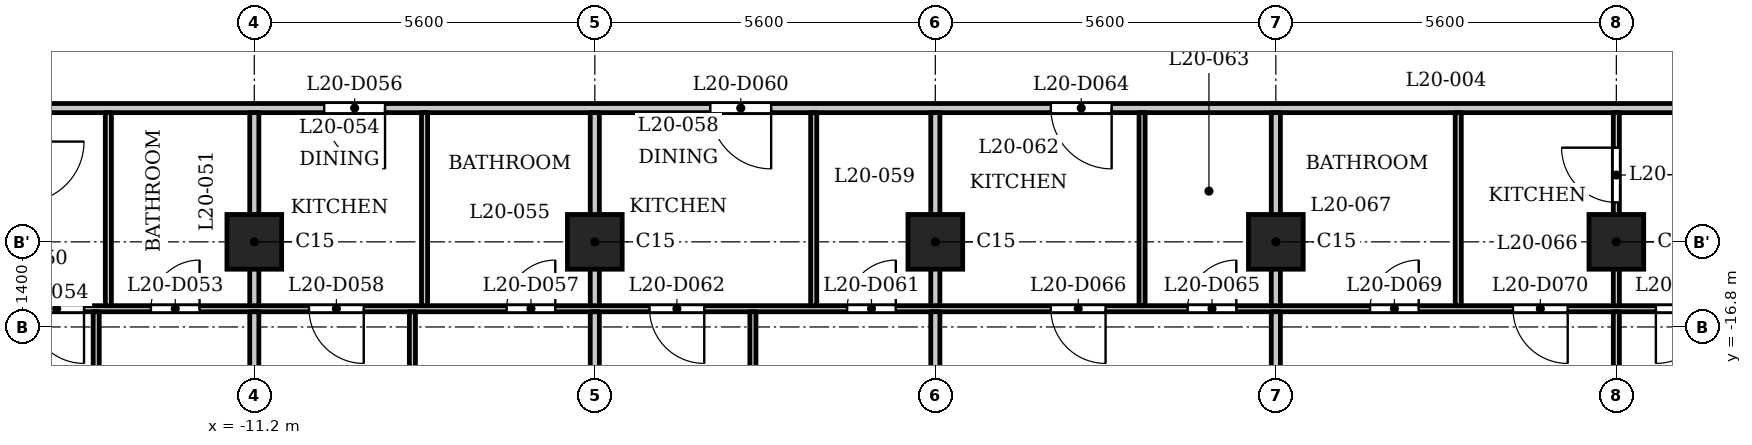
"""IFC4 building model, lengths in metres.
Left out: names, types, materials, properties, quantities, classifications, styles, units other than length and angle.
Written with IfcOpenShell. Run it as: python <this file> out.ifc"""

import sys

from ifc_helpers import new_model, si_unit, direction, frame, frame_2d, origin, origin_2d, place, context, subcontext, project, spatial, rectangle, extrude, element, fill, save


model = new_model("IFC4")
c1 = context("Model", 3, precision=1e-05, world=origin(), true_north=direction((0.0, 1.0)))
c2 = subcontext(c1, "Body", "Model", "MODEL_VIEW")
j1 = project(units=[si_unit("LENGTHUNIT", "METRE"), si_unit("PLANEANGLEUNIT", "RADIAN")], contexts=[c1])
p1 = place(None, origin())
s1 = spatial("IfcSite", under=j1, at=p1, CompositionType="ELEMENT")
p2 = place(p1, origin())
s2 = spatial("IfcBuilding", under=s1, at=p2, CompositionType="ELEMENT")
p3 = place(p2, frame((0.0, 0.0, 83.3)))
s3 = spatial("IfcBuildingStorey", under=s2, at=p3, CompositionType="ELEMENT", Elevation=83.3)
for number, where, z_axis, x_axis in (
    (1, (-11.2, -15.4, 0.0), (0.0, 0.0, 1.0), (1.0, 0.0, 0.0)),
    (2, (-5.6, -15.4, 0.0), (0.0, 0.0, 1.0), (1.0, 0.0, 0.0)),
    (3, (0.0, -15.4, 0.0), (0.0, 0.0, 1.0), (1.0, 0.0, 0.0)),
    (4, (5.6, -15.4, 0.0), (0.0, 0.0, 1.0), (1.0, 0.0, 0.0)),
    (5, (11.2, -15.4, 0.0), (0.0, 0.0, 1.0), (1.0, 0.0, 0.0)),
):
    element("IfcColumn", number, at=place(p3, frame(where, z_axis=z_axis, x_axis=x_axis)), inside=s3, PredefinedType="COLUMN", context=c2, shape_type="SweptSolid", body=[
        extrude(rectangle(XDim=0.9, YDim=0.9, at=origin_2d()), origin(), (0.0, 0.0, 1.0), 3.5),
    ])
p4 = place(p3, frame((-16.725, -16.5, 0.0), z_axis=(0.0, 0.0, 1.0), x_axis=(1.0, 0.0, 0.0)))
e6 = element("IfcWall", 6, at=p4, inside=s3, PredefinedType="PARTITIONING", context=c2, shape_type="SweptSolid", body=[
    extrude(rectangle(XDim=33.45, YDim=0.1, at=frame_2d((16.725, 0.0))), origin(), (0.0, 0.0, 1.0), 3.2),
])
p5 = place(p4, frame((3.825, 0.0, 0.0)))
e7 = element("IfcOpeningElement", 7, at=p5, cuts=e6, PredefinedType="OPENING", context=c2, shape_type="SweptSolid", body=[
    extrude(rectangle(XDim=0.8, YDim=2.1, at=frame_2d((0.4, 1.05))), frame((0.0, 0.06, 0.0), z_axis=(0.0, -1.0, 0.0), x_axis=(1.0, 0.0, 0.0)), (0.0, 0.0, 1.0), 0.12),
])
p6 = place(p4, frame((1.825, 0.0, 0.0)))
e8 = element("IfcOpeningElement", 8, at=p6, cuts=e6, PredefinedType="OPENING", context=c2, shape_type="SweptSolid", body=[
    extrude(rectangle(XDim=0.9, YDim=2.1, at=frame_2d((0.45, 1.05))), frame((0.0, 0.06, 0.0), z_axis=(0.0, -1.0, 0.0), x_axis=(1.0, 0.0, 0.0)), (0.0, 0.0, 1.0), 0.12),
])
p7 = place(p4, frame((9.675, 0.0, 0.0)))
e9 = element("IfcOpeningElement", 9, at=p7, cuts=e6, PredefinedType="OPENING", context=c2, shape_type="SweptSolid", body=[
    extrude(rectangle(XDim=0.8, YDim=2.1, at=frame_2d((0.4, 1.05))), frame((0.0, 0.06, 0.0), z_axis=(0.0, -1.0, 0.0), x_axis=(1.0, 0.0, 0.0)), (0.0, 0.0, 1.0), 0.12),
])
p8 = place(p4, frame((6.425, 0.0, 0.0)))
e10 = element("IfcOpeningElement", 10, at=p8, cuts=e6, PredefinedType="OPENING", context=c2, shape_type="SweptSolid", body=[
    extrude(rectangle(XDim=0.9, YDim=2.1, at=frame_2d((0.45, 1.05))), frame((0.0, 0.06, 0.0), z_axis=(0.0, -1.0, 0.0), x_axis=(1.0, 0.0, 0.0)), (0.0, 0.0, 1.0), 0.12),
])
p9 = place(p4, frame((15.275, 0.0, 0.0)))
e11 = element("IfcOpeningElement", 11, at=p9, cuts=e6, PredefinedType="OPENING", context=c2, shape_type="SweptSolid", body=[
    extrude(rectangle(XDim=0.8, YDim=2.1, at=frame_2d((0.4, 1.05))), frame((0.0, 0.06, 0.0), z_axis=(0.0, -1.0, 0.0), x_axis=(1.0, 0.0, 0.0)), (0.0, 0.0, 1.0), 0.12),
])
p10 = place(p4, frame((12.025, 0.0, 0.0)))
e12 = element("IfcOpeningElement", 12, at=p10, cuts=e6, PredefinedType="OPENING", context=c2, shape_type="SweptSolid", body=[
    extrude(rectangle(XDim=0.9, YDim=2.1, at=frame_2d((0.45, 1.05))), frame((0.0, 0.06, 0.0), z_axis=(0.0, -1.0, 0.0), x_axis=(1.0, 0.0, 0.0)), (0.0, 0.0, 1.0), 0.12),
])
p11 = place(p4, frame((20.875, 0.0, 0.0)))
e13 = element("IfcOpeningElement", 13, at=p11, cuts=e6, PredefinedType="OPENING", context=c2, shape_type="SweptSolid", body=[
    extrude(rectangle(XDim=0.8, YDim=2.1, at=frame_2d((0.4, 1.05))), frame((0.0, 0.06, 0.0), z_axis=(0.0, -1.0, 0.0), x_axis=(1.0, 0.0, 0.0)), (0.0, 0.0, 1.0), 0.12),
])
p12 = place(p4, frame((18.625, 0.0, 0.0)))
e14 = element("IfcOpeningElement", 14, at=p12, cuts=e6, PredefinedType="OPENING", context=c2, shape_type="SweptSolid", body=[
    extrude(rectangle(XDim=0.9, YDim=2.1, at=frame_2d((0.45, 1.05))), frame((0.0, 0.06, 0.0), z_axis=(0.0, -1.0, 0.0), x_axis=(1.0, 0.0, 0.0)), (0.0, 0.0, 1.0), 0.12),
])
p13 = place(p4, frame((23.875, 0.0, 0.0)))
e15 = element("IfcOpeningElement", 15, at=p13, cuts=e6, PredefinedType="OPENING", context=c2, shape_type="SweptSolid", body=[
    extrude(rectangle(XDim=0.8, YDim=2.1, at=frame_2d((0.4, 1.05))), frame((0.0, 0.06, 0.0), z_axis=(0.0, -1.0, 0.0), x_axis=(1.0, 0.0, 0.0)), (0.0, 0.0, 1.0), 0.12),
])
p14 = place(p4, frame((26.225, 0.0, 0.0)))
e16 = element("IfcOpeningElement", 16, at=p14, cuts=e6, PredefinedType="OPENING", context=c2, shape_type="SweptSolid", body=[
    extrude(rectangle(XDim=0.9, YDim=2.1, at=frame_2d((0.45, 1.05))), frame((0.0, 0.06, 0.0), z_axis=(0.0, -1.0, 0.0), x_axis=(1.0, 0.0, 0.0)), (0.0, 0.0, 1.0), 0.12),
])
p15 = place(p4, frame((28.575, 0.0, 0.0)))
e17 = element("IfcOpeningElement", 17, at=p15, cuts=e6, PredefinedType="OPENING", context=c2, shape_type="SweptSolid", body=[
    extrude(rectangle(XDim=0.9, YDim=2.1, at=frame_2d((0.45, 1.05))), frame((0.0, 0.06, 0.0), z_axis=(0.0, -1.0, 0.0), x_axis=(1.0, 0.0, 0.0)), (0.0, 0.0, 1.0), 0.12),
])
p16 = place(p4, frame((30.675, 0.0, 0.0)))
e18 = element("IfcOpeningElement", 18, at=p16, cuts=e6, PredefinedType="OPENING", context=c2, shape_type="SweptSolid", body=[
    extrude(rectangle(XDim=0.9, YDim=2.1, at=frame_2d((0.45, 1.05))), frame((0.0, 0.06, 0.0), z_axis=(0.0, -1.0, 0.0), x_axis=(1.0, 0.0, 0.0)), (0.0, 0.0, 1.0), 0.12),
])
p17 = place(p3, frame((-17.4, -13.2, 0.0), z_axis=(0.0, 0.0, 1.0), x_axis=(1.0, 0.0, 0.0)))
e19 = element("IfcWall", 19, at=p17, inside=s3, PredefinedType="PARTITIONING", context=c2, shape_type="SweptSolid", body=[
    extrude(rectangle(XDim=34.8, YDim=0.15, at=frame_2d((17.4, 0.0))), origin(), (0.0, 0.0, 1.0), 3.2),
])
p18 = place(p17, frame((0.15, 0.0, 0.0)))
e20 = element("IfcOpeningElement", 20, at=p18, cuts=e19, PredefinedType="OPENING", context=c2, shape_type="SweptSolid", body=[
    extrude(rectangle(XDim=1.0, YDim=2.1, at=frame_2d((0.5, 1.05))), frame((0.0, 0.085, 0.0), z_axis=(0.0, -1.0, 0.0), x_axis=(1.0, 0.0, 0.0)), (0.0, 0.0, 1.0), 0.17),
])
p19 = place(p17, frame((33.55, 0.0, 0.0)))
e21 = element("IfcOpeningElement", 21, at=p19, cuts=e19, PredefinedType="OPENING", context=c2, shape_type="SweptSolid", body=[
    extrude(rectangle(XDim=1.0, YDim=2.1, at=frame_2d((0.5, 1.05))), frame((0.0, 0.085, 0.0), z_axis=(0.0, -1.0, 0.0), x_axis=(1.0, 0.0, 0.0)), (0.0, 0.0, 1.0), 0.17),
])
p20 = place(p17, frame((7.35, 0.0, 0.0)))
e22 = element("IfcOpeningElement", 22, at=p20, cuts=e19, PredefinedType="OPENING", context=c2, shape_type="SweptSolid", body=[
    extrude(rectangle(XDim=1.0, YDim=2.1, at=frame_2d((0.5, 1.05))), frame((0.0, 0.085, 0.0), z_axis=(0.0, -1.0, 0.0), x_axis=(1.0, 0.0, 0.0)), (0.0, 0.0, 1.0), 0.17),
])
p21 = place(p17, frame((13.7, 0.0, 0.0)))
e23 = element("IfcOpeningElement", 23, at=p21, cuts=e19, PredefinedType="OPENING", context=c2, shape_type="SweptSolid", body=[
    extrude(rectangle(XDim=1.0, YDim=2.1, at=frame_2d((0.5, 1.05))), frame((0.0, 0.085, 0.0), z_axis=(0.0, -1.0, 0.0), x_axis=(1.0, 0.0, 0.0)), (0.0, 0.0, 1.0), 0.17),
])
p22 = place(p17, frame((19.3, 0.0, 0.0)))
e24 = element("IfcOpeningElement", 24, at=p22, cuts=e19, PredefinedType="OPENING", context=c2, shape_type="SweptSolid", body=[
    extrude(rectangle(XDim=1.0, YDim=2.1, at=frame_2d((0.5, 1.05))), frame((0.0, 0.085, 0.0), z_axis=(0.0, -1.0, 0.0), x_axis=(1.0, 0.0, 0.0)), (0.0, 0.0, 1.0), 0.17),
])
p23 = place(p3, frame((-13.8, -22.08, 0.0), z_axis=(0.0, 0.0, 1.0), x_axis=(0.0, 1.0, 0.0)))
e25 = element("IfcWall", 25, at=p23, inside=s3, PredefinedType="PARTITIONING", context=c2, shape_type="SweptSolid", body=[
    extrude(rectangle(XDim=5.53, YDim=0.1, at=frame_2d((2.765, 0.0))), origin(), (0.0, 0.0, 1.0), 3.2),
])
p24 = place(p23, frame((0.42, 0.0, 0.0)))
e26 = element("IfcOpeningElement", 26, at=p24, cuts=e25, PredefinedType="OPENING", context=c2, shape_type="SweptSolid", body=[
    extrude(rectangle(XDim=0.9, YDim=2.1, at=frame_2d((0.45, 1.05))), frame((0.0, 0.06, 0.0), z_axis=(0.0, -1.0, 0.0), x_axis=(1.0, 0.0, 0.0)), (0.0, 0.0, 1.0), 0.12),
])
p25 = place(p3, frame((-13.6, -16.45, 0.0), z_axis=(0.0, 0.0, 1.0), x_axis=(0.0, 1.0, 0.0)))
e27 = element("IfcWall", 27, at=p25, inside=s3, PredefinedType="PARTITIONING", context=c2, shape_type="SweptSolid", body=[
    extrude(rectangle(XDim=3.175, YDim=0.1, at=frame_2d((1.587, 0.0))), origin(), (0.0, 0.0, 1.0), 3.2),
])
p26 = place(p3, frame((-11.2, -23.03, 0.0), z_axis=(0.0, 0.0, 1.0), x_axis=(0.0, 1.0, 0.0)))
e28 = element("IfcWall", 28, at=p26, inside=s3, PredefinedType="PARTITIONING", context=c2, shape_type="SweptSolid", body=[
    extrude(rectangle(XDim=6.48, YDim=0.15, at=frame_2d((3.24, 0.0))), origin(), (0.0, 0.0, 1.0), 3.2),
])
p27 = place(p3, frame((-11.2, -16.45, 0.0), z_axis=(0.0, 0.0, 1.0), x_axis=(0.0, 1.0, 0.0)))
e29 = element("IfcWall", 29, at=p27, inside=s3, PredefinedType="PARTITIONING", context=c2, shape_type="SweptSolid", body=[
    extrude(rectangle(XDim=3.175, YDim=0.15, at=frame_2d((1.587, 0.0))), origin(), (0.0, 0.0, 1.0), 3.2),
])
p28 = place(p3, frame((-8.6, -22.08, 0.0), z_axis=(0.0, 0.0, 1.0), x_axis=(0.0, 1.0, 0.0)))
e30 = element("IfcWall", 30, at=p28, inside=s3, PredefinedType="PARTITIONING", context=c2, shape_type="SweptSolid", body=[
    extrude(rectangle(XDim=5.53, YDim=0.1, at=frame_2d((2.765, 0.0))), origin(), (0.0, 0.0, 1.0), 3.2),
])
p29 = place(p28, frame((0.42, 0.0, 0.0)))
e31 = element("IfcOpeningElement", 31, at=p29, cuts=e30, PredefinedType="OPENING", context=c2, shape_type="SweptSolid", body=[
    extrude(rectangle(XDim=0.9, YDim=2.1, at=frame_2d((0.45, 1.05))), frame((0.0, 0.06, 0.0), z_axis=(0.0, -1.0, 0.0), x_axis=(1.0, 0.0, 0.0)), (0.0, 0.0, 1.0), 0.12),
])
p30 = place(p3, frame((-8.4, -16.45, 0.0), z_axis=(0.0, 0.0, 1.0), x_axis=(0.0, 1.0, 0.0)))
e32 = element("IfcWall", 32, at=p30, inside=s3, PredefinedType="PARTITIONING", context=c2, shape_type="SweptSolid", body=[
    extrude(rectangle(XDim=3.175, YDim=0.1, at=frame_2d((1.587, 0.0))), origin(), (0.0, 0.0, 1.0), 3.2),
])
p31 = place(p3, frame((-5.6, -23.03, 0.0), z_axis=(0.0, 0.0, 1.0), x_axis=(0.0, 1.0, 0.0)))
e33 = element("IfcWall", 33, at=p31, inside=s3, PredefinedType="PARTITIONING", context=c2, shape_type="SweptSolid", body=[
    extrude(rectangle(XDim=6.48, YDim=0.15, at=frame_2d((3.24, 0.0))), origin(), (0.0, 0.0, 1.0), 3.2),
])
p32 = place(p3, frame((-5.6, -16.45, 0.0), z_axis=(0.0, 0.0, 1.0), x_axis=(0.0, 1.0, 0.0)))
e34 = element("IfcWall", 34, at=p32, inside=s3, PredefinedType="PARTITIONING", context=c2, shape_type="SweptSolid", body=[
    extrude(rectangle(XDim=3.175, YDim=0.15, at=frame_2d((1.587, 0.0))), origin(), (0.0, 0.0, 1.0), 3.2),
])
p33 = place(p3, frame((-3.0, -22.08, 0.0), z_axis=(0.0, 0.0, 1.0), x_axis=(0.0, 1.0, 0.0)))
e35 = element("IfcWall", 35, at=p33, inside=s3, PredefinedType="PARTITIONING", context=c2, shape_type="SweptSolid", body=[
    extrude(rectangle(XDim=5.53, YDim=0.1, at=frame_2d((2.765, 0.0))), origin(), (0.0, 0.0, 1.0), 3.2),
])
p34 = place(p33, frame((0.42, 0.0, 0.0)))
e36 = element("IfcOpeningElement", 36, at=p34, cuts=e35, PredefinedType="OPENING", context=c2, shape_type="SweptSolid", body=[
    extrude(rectangle(XDim=0.9, YDim=2.1, at=frame_2d((0.45, 1.05))), frame((0.0, 0.06, 0.0), z_axis=(0.0, -1.0, 0.0), x_axis=(1.0, 0.0, 0.0)), (0.0, 0.0, 1.0), 0.12),
])
p35 = place(p3, frame((-2.0, -16.45, 0.0), z_axis=(0.0, 0.0, 1.0), x_axis=(0.0, 1.0, 0.0)))
e37 = element("IfcWall", 37, at=p35, inside=s3, PredefinedType="PARTITIONING", context=c2, shape_type="SweptSolid", body=[
    extrude(rectangle(XDim=3.175, YDim=0.1, at=frame_2d((1.587, 0.0))), origin(), (0.0, 0.0, 1.0), 3.2),
])
p36 = place(p3, frame((0.0, -23.03, 0.0), z_axis=(0.0, 0.0, 1.0), x_axis=(0.0, 1.0, 0.0)))
e38 = element("IfcWall", 38, at=p36, inside=s3, PredefinedType="PARTITIONING", context=c2, shape_type="SweptSolid", body=[
    extrude(rectangle(XDim=6.48, YDim=0.15, at=frame_2d((3.24, 0.0))), origin(), (0.0, 0.0, 1.0), 3.2),
])
p37 = place(p3, frame((0.0, -16.45, 0.0), z_axis=(0.0, 0.0, 1.0), x_axis=(0.0, 1.0, 0.0)))
e39 = element("IfcWall", 39, at=p37, inside=s3, PredefinedType="PARTITIONING", context=c2, shape_type="SweptSolid", body=[
    extrude(rectangle(XDim=3.175, YDim=0.15, at=frame_2d((1.587, 0.0))), origin(), (0.0, 0.0, 1.0), 3.2),
])
p38 = place(p3, frame((3.4, -16.45, 0.0), z_axis=(0.0, 0.0, 1.0), x_axis=(0.0, 1.0, 0.0)))
e40 = element("IfcWall", 40, at=p38, inside=s3, PredefinedType="PARTITIONING", context=c2, shape_type="SweptSolid", body=[
    extrude(rectangle(XDim=3.175, YDim=0.1, at=frame_2d((1.587, 0.0))), origin(), (0.0, 0.0, 1.0), 3.2),
])
p39 = place(p3, frame((5.6, -23.03, 0.0), z_axis=(0.0, 0.0, 1.0), x_axis=(0.0, 1.0, 0.0)))
e41 = element("IfcWall", 41, at=p39, inside=s3, PredefinedType="PARTITIONING", context=c2, shape_type="SweptSolid", body=[
    extrude(rectangle(XDim=6.48, YDim=0.15, at=frame_2d((3.24, 0.0))), origin(), (0.0, 0.0, 1.0), 3.2),
])
p40 = place(p3, frame((5.6, -16.45, 0.0), z_axis=(0.0, 0.0, 1.0), x_axis=(0.0, 1.0, 0.0)))
e42 = element("IfcWall", 42, at=p40, inside=s3, PredefinedType="PARTITIONING", context=c2, shape_type="SweptSolid", body=[
    extrude(rectangle(XDim=3.175, YDim=0.15, at=frame_2d((1.587, 0.0))), origin(), (0.0, 0.0, 1.0), 3.2),
])
p41 = place(p3, frame((8.6, -16.45, 0.0), z_axis=(0.0, 0.0, 1.0), x_axis=(0.0, 1.0, 0.0)))
e43 = element("IfcWall", 43, at=p41, inside=s3, PredefinedType="PARTITIONING", context=c2, shape_type="SweptSolid", body=[
    extrude(rectangle(XDim=3.175, YDim=0.1, at=frame_2d((1.587, 0.0))), origin(), (0.0, 0.0, 1.0), 3.2),
])
p42 = place(p3, frame((11.2, -23.03, 0.0), z_axis=(0.0, 0.0, 1.0), x_axis=(0.0, 1.0, 0.0)))
e44 = element("IfcWall", 44, at=p42, inside=s3, PredefinedType="PARTITIONING", context=c2, shape_type="SweptSolid", body=[
    extrude(rectangle(XDim=6.48, YDim=0.1, at=frame_2d((3.24, 0.0))), origin(), (0.0, 0.0, 1.0), 3.2),
])
p43 = place(p3, frame((11.2, -16.45, 0.0), z_axis=(0.0, 0.0, 1.0), x_axis=(0.0, 1.0, 0.0)))
e45 = element("IfcWall", 45, at=p43, inside=s3, PredefinedType="PARTITIONING", context=c2, shape_type="SweptSolid", body=[
    extrude(rectangle(XDim=3.175, YDim=0.1, at=frame_2d((1.587, 0.0))), origin(), (0.0, 0.0, 1.0), 3.2),
])
p44 = place(p43, frame((1.699, 0.0, 0.0)))
e46 = element("IfcOpeningElement", 46, at=p44, cuts=e45, PredefinedType="OPENING", context=c2, shape_type="SweptSolid", body=[
    extrude(rectangle(XDim=0.9, YDim=2.1, at=frame_2d((0.45, 1.05))), frame((0.0, 0.06, 0.0), z_axis=(0.0, -1.0, 0.0), x_axis=(1.0, 0.0, 0.0)), (0.0, 0.0, 1.0), 0.12),
])
p45 = place(p5, origin())
e47 = element("IfcDoor", 47, at=p45, inside=s3, OperationType="SINGLE_SWING_LEFT", PredefinedType="DOOR", context=c2, shape_type="SweptSolid", body=[
    extrude(rectangle(XDim=0.8, YDim=2.1, at=frame_2d((0.4, 1.05))), frame((0.0, 0.025, 0.0), z_axis=(0.0, -1.0, 0.0), x_axis=(1.0, 0.0, 0.0)), (0.0, 0.0, 1.0), 0.05),
])
fill(e7, e47)
p46 = place(p6, origin())
e48 = element("IfcDoor", 48, at=p46, inside=s3, OperationType="SINGLE_SWING_RIGHT", PredefinedType="DOOR", context=c2, shape_type="SweptSolid", body=[
    extrude(rectangle(XDim=0.9, YDim=2.1, at=frame_2d((0.45, 1.05))), frame((0.0, 0.025, 0.0), z_axis=(0.0, -1.0, 0.0), x_axis=(1.0, 0.0, 0.0)), (0.0, 0.0, 1.0), 0.05),
])
fill(e8, e48)
p47 = place(p20, origin())
e49 = element("IfcDoor", 49, at=p47, inside=s3, OperationType="SINGLE_SWING_RIGHT", PredefinedType="DOOR", context=c2, shape_type="SweptSolid", body=[
    extrude(rectangle(XDim=1.0, YDim=2.1, at=frame_2d((0.5, 1.05))), frame((0.0, 0.025, 0.0), z_axis=(0.0, -1.0, 0.0), x_axis=(1.0, 0.0, 0.0)), (0.0, 0.0, 1.0), 0.05),
])
fill(e22, e49)
p48 = place(p7, origin())
e50 = element("IfcDoor", 50, at=p48, inside=s3, OperationType="SINGLE_SWING_LEFT", PredefinedType="DOOR", context=c2, shape_type="SweptSolid", body=[
    extrude(rectangle(XDim=0.8, YDim=2.1, at=frame_2d((0.4, 1.05))), frame((0.0, 0.025, 0.0), z_axis=(0.0, -1.0, 0.0), x_axis=(1.0, 0.0, 0.0)), (0.0, 0.0, 1.0), 0.05),
])
fill(e9, e50)
p49 = place(p8, origin())
e51 = element("IfcDoor", 51, at=p49, inside=s3, OperationType="SINGLE_SWING_RIGHT", PredefinedType="DOOR", context=c2, shape_type="SweptSolid", body=[
    extrude(rectangle(XDim=0.9, YDim=2.1, at=frame_2d((0.45, 1.05))), frame((0.0, 0.025, 0.0), z_axis=(0.0, -1.0, 0.0), x_axis=(1.0, 0.0, 0.0)), (0.0, 0.0, 1.0), 0.05),
])
fill(e10, e51)
p50 = place(p21, origin())
e52 = element("IfcDoor", 52, at=p50, inside=s3, OperationType="SINGLE_SWING_RIGHT", PredefinedType="DOOR", context=c2, shape_type="SweptSolid", body=[
    extrude(rectangle(XDim=1.0, YDim=2.1, at=frame_2d((0.5, 1.05))), frame((0.0, 0.025, 0.0), z_axis=(0.0, -1.0, 0.0), x_axis=(1.0, 0.0, 0.0)), (0.0, 0.0, 1.0), 0.05),
])
fill(e23, e52)
p51 = place(p9, origin())
e53 = element("IfcDoor", 53, at=p51, inside=s3, OperationType="SINGLE_SWING_LEFT", PredefinedType="DOOR", context=c2, shape_type="SweptSolid", body=[
    extrude(rectangle(XDim=0.8, YDim=2.1, at=frame_2d((0.4, 1.05))), frame((0.0, 0.025, 0.0), z_axis=(0.0, -1.0, 0.0), x_axis=(1.0, 0.0, 0.0)), (0.0, 0.0, 1.0), 0.05),
])
fill(e11, e53)
p52 = place(p10, origin())
e54 = element("IfcDoor", 54, at=p52, inside=s3, OperationType="SINGLE_SWING_RIGHT", PredefinedType="DOOR", context=c2, shape_type="SweptSolid", body=[
    extrude(rectangle(XDim=0.9, YDim=2.1, at=frame_2d((0.45, 1.05))), frame((0.0, 0.025, 0.0), z_axis=(0.0, -1.0, 0.0), x_axis=(1.0, 0.0, 0.0)), (0.0, 0.0, 1.0), 0.05),
])
fill(e12, e54)
p53 = place(p22, origin())
e55 = element("IfcDoor", 55, at=p53, inside=s3, OperationType="SINGLE_SWING_RIGHT", PredefinedType="DOOR", context=c2, shape_type="SweptSolid", body=[
    extrude(rectangle(XDim=1.0, YDim=2.1, at=frame_2d((0.5, 1.05))), frame((0.0, 0.025, 0.0), z_axis=(0.0, -1.0, 0.0), x_axis=(1.0, 0.0, 0.0)), (0.0, 0.0, 1.0), 0.05),
])
fill(e24, e55)
p54 = place(p11, origin())
e56 = element("IfcDoor", 56, at=p54, inside=s3, OperationType="SINGLE_SWING_LEFT", PredefinedType="DOOR", context=c2, shape_type="SweptSolid", body=[
    extrude(rectangle(XDim=0.8, YDim=2.1, at=frame_2d((0.4, 1.05))), frame((0.0, 0.025, 0.0), z_axis=(0.0, -1.0, 0.0), x_axis=(1.0, 0.0, 0.0)), (0.0, 0.0, 1.0), 0.05),
])
fill(e13, e56)
p55 = place(p12, origin())
e57 = element("IfcDoor", 57, at=p55, inside=s3, OperationType="SINGLE_SWING_RIGHT", PredefinedType="DOOR", context=c2, shape_type="SweptSolid", body=[
    extrude(rectangle(XDim=0.9, YDim=2.1, at=frame_2d((0.45, 1.05))), frame((0.0, 0.025, 0.0), z_axis=(0.0, -1.0, 0.0), x_axis=(1.0, 0.0, 0.0)), (0.0, 0.0, 1.0), 0.05),
])
fill(e14, e57)
p56 = place(p44, origin())
e58 = element("IfcDoor", 58, at=p56, inside=s3, OperationType="SINGLE_SWING_LEFT", PredefinedType="DOOR", context=c2, shape_type="SweptSolid", body=[
    extrude(rectangle(XDim=0.9, YDim=2.1, at=frame_2d((0.45, 1.05))), frame((0.0, 0.025, 0.0), z_axis=(0.0, -1.0, 0.0), x_axis=(1.0, 0.0, 0.0)), (0.0, 0.0, 1.0), 0.05),
])
fill(e46, e58)
p57 = place(p13, origin())
e59 = element("IfcDoor", 59, at=p57, inside=s3, OperationType="SINGLE_SWING_LEFT", PredefinedType="DOOR", context=c2, shape_type="SweptSolid", body=[
    extrude(rectangle(XDim=0.8, YDim=2.1, at=frame_2d((0.4, 1.05))), frame((0.0, 0.025, 0.0), z_axis=(0.0, -1.0, 0.0), x_axis=(1.0, 0.0, 0.0)), (0.0, 0.0, 1.0), 0.05),
])
fill(e15, e59)
p58 = place(p14, origin())
e60 = element("IfcDoor", 60, at=p58, inside=s3, OperationType="SINGLE_SWING_RIGHT", PredefinedType="DOOR", context=c2, shape_type="SweptSolid", body=[
    extrude(rectangle(XDim=0.9, YDim=2.1, at=frame_2d((0.45, 1.05))), frame((0.0, 0.025, 0.0), z_axis=(0.0, -1.0, 0.0), x_axis=(1.0, 0.0, 0.0)), (0.0, 0.0, 1.0), 0.05),
])
fill(e16, e60)
p59 = place(p15, origin())
e61 = element("IfcDoor", 61, at=p59, inside=s3, OperationType="SINGLE_SWING_LEFT", PredefinedType="DOOR", context=c2, shape_type="SweptSolid", body=[
    extrude(rectangle(XDim=0.9, YDim=2.1, at=frame_2d((0.45, 1.05))), frame((0.0, 0.025, 0.0), z_axis=(0.0, -1.0, 0.0), x_axis=(1.0, 0.0, 0.0)), (0.0, 0.0, 1.0), 0.05),
])
fill(e17, e61)
save(model, sys.argv[1])
